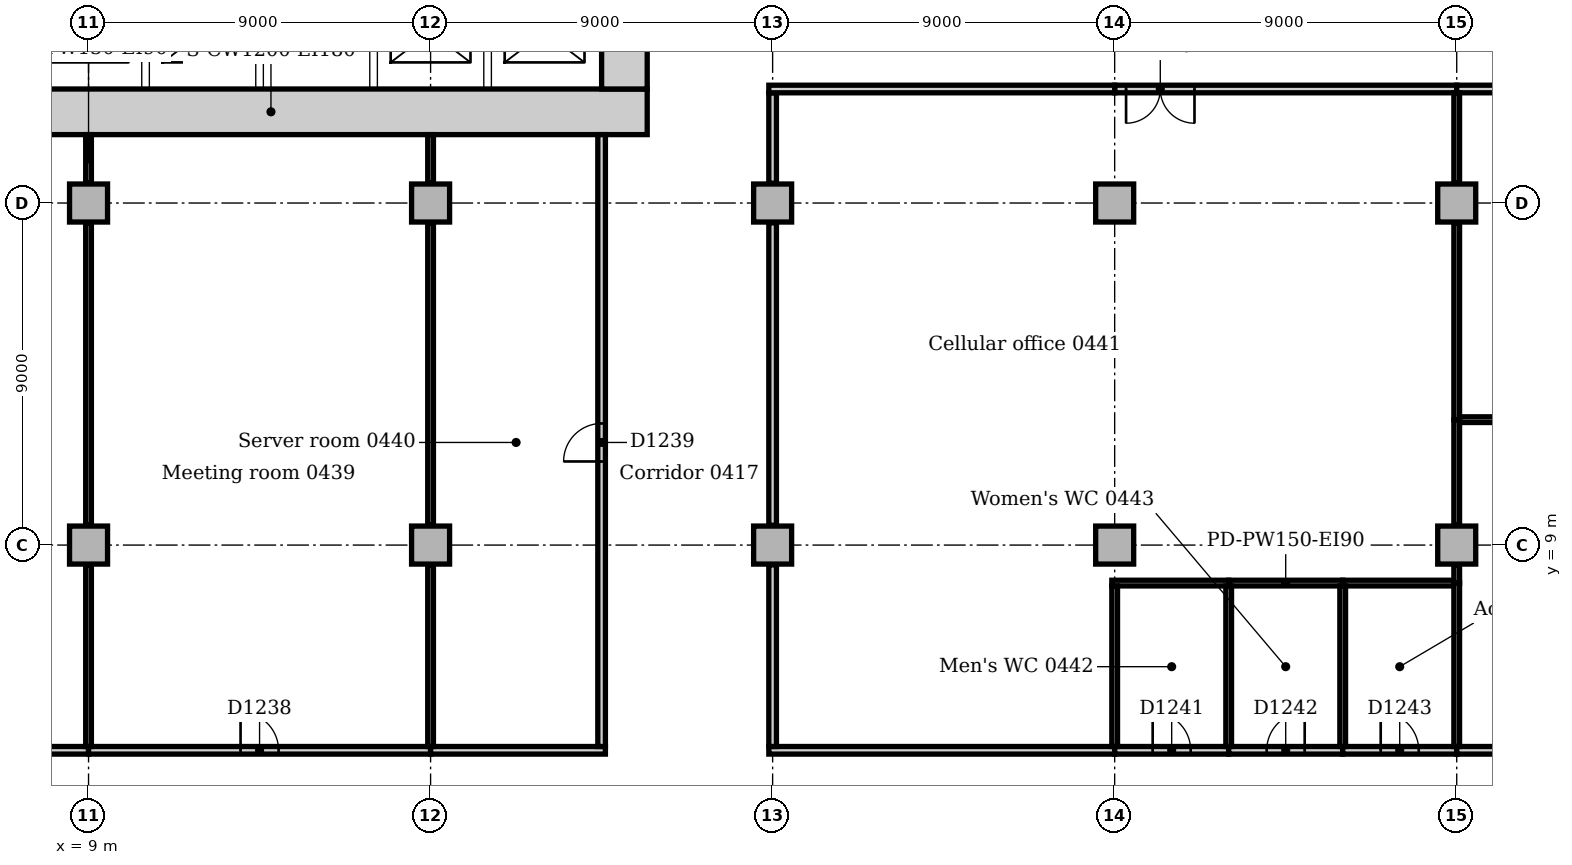
"""IFC4 building model, lengths in metres.
Left out: names, types, materials, properties, quantities, classifications, styles, units other than length and angle.
Written with IfcOpenShell. Run it as: python <this file> out.ifc"""

import sys

from ifc_helpers import new_model, si_unit, direction, frame, frame_2d, origin, origin_2d, place, context, subcontext, project, spatial, rectangle, extrude, element, fill, save


model = new_model("IFC4")
c1 = context("Model", 3, precision=1e-05, world=origin(), true_north=direction((0.0, 1.0)))
c2 = subcontext(c1, "Body", "Model", "MODEL_VIEW")
j1 = project(units=[si_unit("LENGTHUNIT", "METRE"), si_unit("PLANEANGLEUNIT", "RADIAN")], contexts=[c1])
p1 = place(None, origin())
s1 = spatial("IfcSite", under=j1, at=p1, CompositionType="ELEMENT")
p2 = place(p1, origin())
s2 = spatial("IfcBuilding", under=s1, at=p2, CompositionType="ELEMENT")
p3 = place(p2, frame((0.0, 0.0, 21.0)))
s3 = spatial("IfcBuildingStorey", under=s2, at=p3, CompositionType="ELEMENT", Elevation=21.0)
p4 = place(p3, frame((3.9, 20.4, 0.0), z_axis=(0.0, 0.0, 1.0), x_axis=(1.0, 0.0, 0.0)))
e1 = element("IfcWall", 1, at=p4, inside=s3, PredefinedType="SOLIDWALL", context=c2, shape_type="SweptSolid", body=[
    extrude(rectangle(XDim=19.8, YDim=1.2, at=frame_2d((9.9, 0.0))), origin(), (0.0, 0.0, 1.0), 5.0),
])
p5 = place(p3, frame((23.1, 21.0, 0.0), z_axis=(0.0, 0.0, 1.0), x_axis=(0.0, 1.0, 0.0)))
e2 = element("IfcWall", 2, at=p5, inside=s3, PredefinedType="SOLIDWALL", context=c2, shape_type="SweptSolid", body=[
    extrude(rectangle(XDim=10.5, YDim=1.2, at=frame_2d((5.25, 0.0))), origin(), (0.0, 0.0, 1.0), 5.0),
])
p6 = place(p5, frame((4.35, 0.0, 0.0)))
e3 = element("IfcOpeningElement", 3, at=p6, cuts=e2, PredefinedType="OPENING", context=c2, shape_type="SweptSolid", body=[
    extrude(rectangle(XDim=1.8, YDim=2.1, at=frame_2d((0.9, 1.05))), frame((0.0, 0.61, 0.0), z_axis=(0.0, -1.0, 0.0), x_axis=(1.0, 0.0, 0.0)), (0.0, 0.0, 1.0), 1.22),
])
for number, where, z_axis, x_axis in (
    (4, (9.0, 9.0, 0.0), (0.0, 0.0, 1.0), (1.0, 0.0, 0.0)),
    (5, (9.0, 18.0, 0.0), (0.0, 0.0, 1.0), (1.0, 0.0, 0.0)),
    (6, (18.0, 9.0, 0.0), (0.0, 0.0, 1.0), (1.0, 0.0, 0.0)),
    (7, (18.0, 18.0, 0.0), (0.0, 0.0, 1.0), (1.0, 0.0, 0.0)),
    (8, (27.0, 9.0, 0.0), (0.0, 0.0, 1.0), (1.0, 0.0, 0.0)),
    (9, (27.0, 18.0, 0.0), (0.0, 0.0, 1.0), (1.0, 0.0, 0.0)),
    (10, (36.0, 9.0, 0.0), (0.0, 0.0, 1.0), (1.0, 0.0, 0.0)),
    (11, (36.0, 18.0, 0.0), (0.0, 0.0, 1.0), (1.0, 0.0, 0.0)),
    (12, (45.0, 9.0, 0.0), (0.0, 0.0, 1.0), (1.0, 0.0, 0.0)),
    (13, (45.0, 18.0, 0.0), (0.0, 0.0, 1.0), (1.0, 0.0, 0.0)),
):
    element("IfcColumn", number, at=place(p3, frame(where, z_axis=z_axis, x_axis=x_axis)), inside=s3, PredefinedType="COLUMN", context=c2, shape_type="SweptSolid", body=[
        extrude(rectangle(XDim=1.0, YDim=1.0, at=origin_2d()), origin(), (0.0, 0.0, 1.0), 4.85),
    ])
p7 = place(p3, frame((2.073, 3.6, 0.0), z_axis=(0.0, 0.0, 1.0), x_axis=(1.0, 0.0, 0.0)))
e14 = element("IfcWall", 14, at=p7, inside=s3, PredefinedType="PARTITIONING", context=c2, shape_type="SweptSolid", body=[
    extrude(rectangle(XDim=6.927, YDim=0.2, at=frame_2d((3.463, 0.0))), origin(), (0.0, 0.0, 1.0), 4.85),
])
p8 = place(p3, frame((9.0, 3.6, 0.0), z_axis=(0.0, 0.0, 1.0), x_axis=(1.0, 0.0, 0.0)))
e15 = element("IfcWall", 15, at=p8, inside=s3, PredefinedType="PARTITIONING", context=c2, shape_type="SweptSolid", body=[
    extrude(rectangle(XDim=9.0, YDim=0.2, at=frame_2d((4.5, 0.0))), origin(), (0.0, 0.0, 1.0), 4.85),
])
p9 = place(p8, frame((4.0, 0.0, 0.0)))
e16 = element("IfcOpeningElement", 16, at=p9, cuts=e15, PredefinedType="OPENING", context=c2, shape_type="SweptSolid", body=[
    extrude(rectangle(XDim=1.0, YDim=2.1, at=frame_2d((0.5, 1.05))), frame((0.0, 0.11, 0.0), z_axis=(0.0, -1.0, 0.0), x_axis=(1.0, 0.0, 0.0)), (0.0, 0.0, 1.0), 0.22),
])
p10 = place(p3, frame((18.0, 3.6, 0.0), z_axis=(0.0, 0.0, 1.0), x_axis=(1.0, 0.0, 0.0)))
e17 = element("IfcWall", 17, at=p10, inside=s3, PredefinedType="PARTITIONING", context=c2, shape_type="SweptSolid", body=[
    extrude(rectangle(XDim=4.6, YDim=0.2, at=frame_2d((2.3, 0.0))), origin(), (0.0, 0.0, 1.0), 4.85),
])
p11 = place(p3, frame((26.9, 3.6, 0.0), z_axis=(0.0, 0.0, 1.0), x_axis=(1.0, 0.0, 0.0)))
e18 = element("IfcWall", 18, at=p11, inside=s3, PredefinedType="PARTITIONING", context=c2, shape_type="SweptSolid", body=[
    extrude(rectangle(XDim=9.1, YDim=0.2, at=frame_2d((4.55, 0.0))), origin(), (0.0, 0.0, 1.0), 4.85),
])
p12 = place(p3, frame((36.0, 3.6, 0.0), z_axis=(0.0, 0.0, 1.0), x_axis=(1.0, 0.0, 0.0)))
e19 = element("IfcWall", 19, at=p12, inside=s3, PredefinedType="PARTITIONING", context=c2, shape_type="SweptSolid", body=[
    extrude(rectangle(XDim=3.0, YDim=0.2, at=frame_2d((1.5, 0.0))), origin(), (0.0, 0.0, 1.0), 4.85),
])
p13 = place(p12, frame((1.0, 0.0, 0.0)))
e20 = element("IfcOpeningElement", 20, at=p13, cuts=e19, PredefinedType="OPENING", context=c2, shape_type="SweptSolid", body=[
    extrude(rectangle(XDim=1.0, YDim=2.1, at=frame_2d((0.5, 1.05))), frame((0.0, 0.11, 0.0), z_axis=(0.0, -1.0, 0.0), x_axis=(1.0, 0.0, 0.0)), (0.0, 0.0, 1.0), 0.22),
])
p14 = place(p3, frame((39.0, 3.6, 0.0), z_axis=(0.0, 0.0, 1.0), x_axis=(1.0, 0.0, 0.0)))
e21 = element("IfcWall", 21, at=p14, inside=s3, PredefinedType="PARTITIONING", context=c2, shape_type="SweptSolid", body=[
    extrude(rectangle(XDim=3.0, YDim=0.2, at=frame_2d((1.5, 0.0))), origin(), (0.0, 0.0, 1.0), 4.85),
])
p15 = place(p14, frame((1.0, 0.0, 0.0)))
e22 = element("IfcOpeningElement", 22, at=p15, cuts=e21, PredefinedType="OPENING", context=c2, shape_type="SweptSolid", body=[
    extrude(rectangle(XDim=1.0, YDim=2.1, at=frame_2d((0.5, 1.05))), frame((0.0, 0.11, 0.0), z_axis=(0.0, -1.0, 0.0), x_axis=(1.0, 0.0, 0.0)), (0.0, 0.0, 1.0), 0.22),
])
p16 = place(p3, frame((42.0, 3.6, 0.0), z_axis=(0.0, 0.0, 1.0), x_axis=(1.0, 0.0, 0.0)))
e23 = element("IfcWall", 23, at=p16, inside=s3, PredefinedType="PARTITIONING", context=c2, shape_type="SweptSolid", body=[
    extrude(rectangle(XDim=3.0, YDim=0.2, at=frame_2d((1.5, 0.0))), origin(), (0.0, 0.0, 1.0), 4.85),
])
p17 = place(p16, frame((1.0, 0.0, 0.0)))
e24 = element("IfcOpeningElement", 24, at=p17, cuts=e23, PredefinedType="OPENING", context=c2, shape_type="SweptSolid", body=[
    extrude(rectangle(XDim=1.0, YDim=2.1, at=frame_2d((0.5, 1.05))), frame((0.0, 0.11, 0.0), z_axis=(0.0, -1.0, 0.0), x_axis=(1.0, 0.0, 0.0)), (0.0, 0.0, 1.0), 0.22),
])
p18 = place(p3, frame((45.0, 3.6, 0.0), z_axis=(0.0, 0.0, 1.0), x_axis=(1.0, 0.0, 0.0)))
e25 = element("IfcWall", 25, at=p18, inside=s3, PredefinedType="PARTITIONING", context=c2, shape_type="SweptSolid", body=[
    extrude(rectangle(XDim=10.5, YDim=0.2, at=frame_2d((5.25, 0.0))), origin(), (0.0, 0.0, 1.0), 4.7),
])
p19 = place(p18, frame((4.75, 0.0, 0.0)))
e26 = element("IfcOpeningElement", 26, at=p19, cuts=e25, PredefinedType="OPENING", context=c2, shape_type="SweptSolid", body=[
    extrude(rectangle(XDim=1.0, YDim=2.1, at=frame_2d((0.5, 1.05))), frame((0.0, 0.11, 0.0), z_axis=(0.0, -1.0, 0.0), x_axis=(1.0, 0.0, 0.0)), (0.0, 0.0, 1.0), 0.22),
])
p20 = place(p3, frame((22.5, 3.7, 0.0), z_axis=(0.0, 0.0, 1.0), x_axis=(0.0, 1.0, 0.0)))
e27 = element("IfcWall", 27, at=p20, inside=s3, PredefinedType="PARTITIONING", context=c2, shape_type="SweptSolid", body=[
    extrude(rectangle(XDim=16.1, YDim=0.2, at=frame_2d((8.05, 0.0))), origin(), (0.0, 0.0, 1.0), 4.85),
])
p21 = place(p20, frame((7.5, 0.0, 0.0)))
e28 = element("IfcOpeningElement", 28, at=p21, cuts=e27, PredefinedType="OPENING", context=c2, shape_type="SweptSolid", body=[
    extrude(rectangle(XDim=1.0, YDim=2.1, at=frame_2d((0.5, 1.05))), frame((0.0, 0.11, 0.0), z_axis=(0.0, -1.0, 0.0), x_axis=(1.0, 0.0, 0.0)), (0.0, 0.0, 1.0), 0.22),
])
p22 = place(p3, frame((27.0, 3.7, 0.0), z_axis=(0.0, 0.0, 1.0), x_axis=(0.0, 1.0, 0.0)))
e29 = element("IfcWall", 29, at=p22, inside=s3, PredefinedType="PARTITIONING", context=c2, shape_type="SweptSolid", body=[
    extrude(rectangle(XDim=4.78, YDim=0.2, at=frame_2d((2.39, 0.0))), origin(), (0.0, 0.0, 1.0), 4.158),
])
p23 = place(p3, frame((27.0, 9.52, 0.0), z_axis=(0.0, 0.0, 1.0), x_axis=(0.0, 1.0, 0.0)))
e30 = element("IfcWall", 30, at=p23, inside=s3, PredefinedType="PARTITIONING", context=c2, shape_type="SweptSolid", body=[
    extrude(rectangle(XDim=7.96, YDim=0.2, at=frame_2d((3.98, 0.0))), origin(), (0.0, 0.0, 1.0), 4.158),
])
p24 = place(p3, frame((27.0, 18.52, 0.0), z_axis=(0.0, 0.0, 1.0), x_axis=(0.0, 1.0, 0.0)))
e31 = element("IfcWall", 31, at=p24, inside=s3, PredefinedType="PARTITIONING", context=c2, shape_type="SweptSolid", body=[
    extrude(rectangle(XDim=2.38, YDim=0.2, at=frame_2d((1.19, 0.0))), origin(), (0.0, 0.0, 1.0), 4.158),
])
p25 = place(p3, frame((36.0, 21.0, 0.0), z_axis=(0.0, 0.0, 1.0), x_axis=(1.0, 0.0, 0.0)))
e32 = element("IfcWall", 32, at=p25, inside=s3, PredefinedType="PARTITIONING", context=c2, shape_type="SweptSolid", body=[
    extrude(rectangle(XDim=9.0, YDim=0.2, at=frame_2d((4.5, 0.0))), origin(), (0.0, 0.0, 1.0), 4.85),
])
p26 = place(p25, frame((0.3, 0.0, 0.0)))
e33 = element("IfcOpeningElement", 33, at=p26, cuts=e32, PredefinedType="OPENING", context=c2, shape_type="SweptSolid", body=[
    extrude(rectangle(XDim=1.8, YDim=2.1, at=frame_2d((0.9, 1.05))), frame((0.0, 0.11, 0.0), z_axis=(0.0, -1.0, 0.0), x_axis=(1.0, 0.0, 0.0)), (0.0, 0.0, 1.0), 0.22),
])
p27 = place(p3, frame((26.9, 21.0, 0.0), z_axis=(0.0, 0.0, 1.0), x_axis=(1.0, 0.0, 0.0)))
e34 = element("IfcWall", 34, at=p27, inside=s3, PredefinedType="PARTITIONING", context=c2, shape_type="SweptSolid", body=[
    extrude(rectangle(XDim=9.1, YDim=0.2, at=frame_2d((4.55, 0.0))), origin(), (0.0, 0.0, 1.0), 4.85),
])
p28 = place(p3, frame((45.0, 21.0, 0.0), z_axis=(0.0, 0.0, 1.0), x_axis=(1.0, 0.0, 0.0)))
e35 = element("IfcWall", 35, at=p28, inside=s3, PredefinedType="PARTITIONING", context=c2, shape_type="SweptSolid", body=[
    extrude(rectangle(XDim=10.5, YDim=0.2, at=frame_2d((5.25, 0.0))), origin(), (0.0, 0.0, 1.0), 4.85),
])
p29 = place(p28, frame((4.75, 0.0, 0.0)))
e36 = element("IfcOpeningElement", 36, at=p29, cuts=e35, PredefinedType="OPENING", context=c2, shape_type="SweptSolid", body=[
    extrude(rectangle(XDim=1.0, YDim=2.1, at=frame_2d((0.5, 1.05))), frame((0.0, 0.11, 0.0), z_axis=(0.0, -1.0, 0.0), x_axis=(1.0, 0.0, 0.0)), (0.0, 0.0, 1.0), 0.22),
])
p30 = place(p3, frame((9.0, 3.7, 0.0), z_axis=(0.0, 0.0, 1.0), x_axis=(0.0, 1.0, 0.0)))
e37 = element("IfcWall", 37, at=p30, inside=s3, PredefinedType="PARTITIONING", context=c2, shape_type="SweptSolid", body=[
    extrude(rectangle(XDim=4.78, YDim=0.15, at=frame_2d((2.39, 0.0))), origin(), (0.0, 0.0, 1.0), 4.158),
])
p31 = place(p3, frame((9.0, 9.52, 0.0), z_axis=(0.0, 0.0, 1.0), x_axis=(0.0, 1.0, 0.0)))
e38 = element("IfcWall", 38, at=p31, inside=s3, PredefinedType="PARTITIONING", context=c2, shape_type="SweptSolid", body=[
    extrude(rectangle(XDim=7.96, YDim=0.15, at=frame_2d((3.98, 0.0))), origin(), (0.0, 0.0, 1.0), 4.158),
])
p32 = place(p3, frame((9.0, 18.52, 0.0), z_axis=(0.0, 0.0, 1.0), x_axis=(0.0, 1.0, 0.0)))
e39 = element("IfcWall", 39, at=p32, inside=s3, PredefinedType="PARTITIONING", context=c2, shape_type="SweptSolid", body=[
    extrude(rectangle(XDim=1.28, YDim=0.15, at=frame_2d((0.64, 0.0))), origin(), (0.0, 0.0, 1.0), 4.652),
])
p33 = place(p3, frame((18.0, 3.7, 0.0), z_axis=(0.0, 0.0, 1.0), x_axis=(0.0, 1.0, 0.0)))
e40 = element("IfcWall", 40, at=p33, inside=s3, PredefinedType="PARTITIONING", context=c2, shape_type="SweptSolid", body=[
    extrude(rectangle(XDim=4.78, YDim=0.15, at=frame_2d((2.39, 0.0))), origin(), (0.0, 0.0, 1.0), 4.158),
])
p34 = place(p3, frame((18.0, 9.52, 0.0), z_axis=(0.0, 0.0, 1.0), x_axis=(0.0, 1.0, 0.0)))
e41 = element("IfcWall", 41, at=p34, inside=s3, PredefinedType="PARTITIONING", context=c2, shape_type="SweptSolid", body=[
    extrude(rectangle(XDim=7.96, YDim=0.15, at=frame_2d((3.98, 0.0))), origin(), (0.0, 0.0, 1.0), 4.158),
])
p35 = place(p3, frame((18.0, 18.52, 0.0), z_axis=(0.0, 0.0, 1.0), x_axis=(0.0, 1.0, 0.0)))
e42 = element("IfcWall", 42, at=p35, inside=s3, PredefinedType="PARTITIONING", context=c2, shape_type="SweptSolid", body=[
    extrude(rectangle(XDim=1.28, YDim=0.15, at=frame_2d((0.64, 0.0))), origin(), (0.0, 0.0, 1.0), 4.652),
])
p36 = place(p3, frame((35.925, 8.0, 0.0), z_axis=(0.0, 0.0, 1.0), x_axis=(1.0, 0.0, 0.0)))
e43 = element("IfcWall", 43, at=p36, inside=s3, PredefinedType="PARTITIONING", context=c2, shape_type="SweptSolid", body=[
    extrude(rectangle(XDim=3.075, YDim=0.15, at=frame_2d((1.538, 0.0))), origin(), (0.0, 0.0, 1.0), 4.85),
])
p37 = place(p3, frame((36.0, 3.7, 0.0), z_axis=(0.0, 0.0, 1.0), x_axis=(0.0, 1.0, 0.0)))
e44 = element("IfcWall", 44, at=p37, inside=s3, PredefinedType="PARTITIONING", context=c2, shape_type="SweptSolid", body=[
    extrude(rectangle(XDim=4.225, YDim=0.15, at=frame_2d((2.112, 0.0))), origin(), (0.0, 0.0, 1.0), 4.158),
])
p38 = place(p3, frame((39.0, 8.0, 0.0), z_axis=(0.0, 0.0, 1.0), x_axis=(1.0, 0.0, 0.0)))
e45 = element("IfcWall", 45, at=p38, inside=s3, PredefinedType="PARTITIONING", context=c2, shape_type="SweptSolid", body=[
    extrude(rectangle(XDim=3.0, YDim=0.15, at=frame_2d((1.5, 0.0))), origin(), (0.0, 0.0, 1.0), 4.85),
])
p39 = place(p3, frame((42.0, 8.0, 0.0), z_axis=(0.0, 0.0, 1.0), x_axis=(1.0, 0.0, 0.0)))
e46 = element("IfcWall", 46, at=p39, inside=s3, PredefinedType="PARTITIONING", context=c2, shape_type="SweptSolid", body=[
    extrude(rectangle(XDim=2.925, YDim=0.15, at=frame_2d((1.462, 0.0))), origin(), (0.0, 0.0, 1.0), 4.85),
])
p40 = place(p3, frame((45.0, 8.0, 0.0), z_axis=(0.0, 0.0, 1.0), x_axis=(0.0, 1.0, 0.0)))
e47 = element("IfcWall", 47, at=p40, inside=s3, PredefinedType="PARTITIONING", context=c2, shape_type="SweptSolid", body=[
    extrude(rectangle(XDim=0.48, YDim=0.15, at=frame_2d((0.24, 0.0))), origin(), (0.0, 0.0, 1.0), 4.85),
])
p41 = place(p3, frame((45.0, 9.52, 0.0), z_axis=(0.0, 0.0, 1.0), x_axis=(0.0, 1.0, 0.0)))
e48 = element("IfcWall", 48, at=p41, inside=s3, PredefinedType="PARTITIONING", context=c2, shape_type="SweptSolid", body=[
    extrude(rectangle(XDim=2.78, YDim=0.15, at=frame_2d((1.39, 0.0))), origin(), (0.0, 0.0, 1.0), 4.158),
])
p42 = place(p3, frame((45.0, 12.3, 0.0), z_axis=(0.0, 0.0, 1.0), x_axis=(0.0, 1.0, 0.0)))
e49 = element("IfcWall", 49, at=p42, inside=s3, PredefinedType="PARTITIONING", context=c2, shape_type="SweptSolid", body=[
    extrude(rectangle(XDim=5.18, YDim=0.15, at=frame_2d((2.59, 0.0))), origin(), (0.0, 0.0, 1.0), 4.158),
])
p43 = place(p3, frame((45.0, 18.52, 0.0), z_axis=(0.0, 0.0, 1.0), x_axis=(0.0, 1.0, 0.0)))
e50 = element("IfcWall", 50, at=p43, inside=s3, PredefinedType="PARTITIONING", context=c2, shape_type="SweptSolid", body=[
    extrude(rectangle(XDim=2.38, YDim=0.15, at=frame_2d((1.19, 0.0))), origin(), (0.0, 0.0, 1.0), 4.158),
])
for number, where, z_axis, x_axis in (
    (51, (39.0, 3.7, 0.0), (0.0, 0.0, 1.0), (0.0, 1.0, 0.0)),
    (52, (42.0, 3.7, 0.0), (0.0, 0.0, 1.0), (0.0, 1.0, 0.0)),
):
    element("IfcWall", number, at=place(p3, frame(where, z_axis=z_axis, x_axis=x_axis)), inside=s3, PredefinedType="PARTITIONING", context=c2, shape_type="SweptSolid", body=[
        extrude(rectangle(XDim=4.225, YDim=0.15, at=frame_2d((2.112, 0.0))), origin(), (0.0, 0.0, 1.0), 4.85),
    ])
p44 = place(p3, frame((45.0, 3.7, 0.0), z_axis=(0.0, 0.0, 1.0), x_axis=(0.0, 1.0, 0.0)))
e53 = element("IfcWall", 53, at=p44, inside=s3, PredefinedType="PARTITIONING", context=c2, shape_type="SweptSolid", body=[
    extrude(rectangle(XDim=4.3, YDim=0.15, at=frame_2d((2.15, 0.0))), origin(), (0.0, 0.0, 1.0), 4.158),
])
p45 = place(p3, frame((45.075, 12.3, 0.0), z_axis=(0.0, 0.0, 1.0), x_axis=(1.0, 0.0, 0.0)))
e54 = element("IfcWall", 54, at=p45, inside=s3, PredefinedType="PARTITIONING", context=c2, shape_type="SweptSolid", body=[
    extrude(rectangle(XDim=10.425, YDim=0.15, at=frame_2d((5.213, 0.0))), origin(), (0.0, 0.0, 1.0), 4.85),
])
for number, where, z_axis, x_axis in (
    (55, (10.5, 21.0, 0.0), (0.0, 0.0, 1.0), (0.0, 1.0, 0.0)),
    (56, (13.5, 21.0, 0.0), (0.0, 0.0, 1.0), (0.0, 1.0, 0.0)),
    (57, (16.5, 21.0, 0.0), (0.0, 0.0, 1.0), (0.0, 1.0, 0.0)),
    (58, (19.5, 21.0, 0.0), (0.0, 0.0, 1.0), (0.0, 1.0, 0.0)),
):
    element("IfcWall", number, at=place(p3, frame(where, z_axis=z_axis, x_axis=x_axis)), inside=s3, PredefinedType="PARTITIONING", context=c2, shape_type="SweptSolid", body=[
        extrude(rectangle(XDim=2.9, YDim=0.2, at=frame_2d((1.45, 0.0))), origin(), (0.0, 0.0, 1.0), 4.85),
    ])
p46 = place(p9, origin())
e59 = element("IfcDoor", 59, at=p46, inside=s3, OperationType="SINGLE_SWING_LEFT", PredefinedType="DOOR", context=c2, shape_type="SweptSolid", body=[
    extrude(rectangle(XDim=1.0, YDim=2.1, at=frame_2d((0.5, 1.05))), frame((0.0, 0.025, 0.0), z_axis=(0.0, -1.0, 0.0), x_axis=(1.0, 0.0, 0.0)), (0.0, 0.0, 1.0), 0.05),
])
fill(e16, e59)
p47 = place(p21, origin())
e60 = element("IfcDoor", 60, at=p47, inside=s3, OperationType="SINGLE_SWING_LEFT", PredefinedType="DOOR", context=c2, shape_type="SweptSolid", body=[
    extrude(rectangle(XDim=1.0, YDim=2.1, at=frame_2d((0.5, 1.05))), frame((0.0, 0.025, 0.0), z_axis=(0.0, -1.0, 0.0), x_axis=(1.0, 0.0, 0.0)), (0.0, 0.0, 1.0), 0.05),
])
fill(e28, e60)
p48 = place(p26, frame((1.8, 0.0, 0.0), z_axis=(0.0, 0.0, 1.0), x_axis=(-1.0, 0.0, 0.0)))
e61 = element("IfcDoor", 61, at=p48, inside=s3, OperationType="DOUBLE_DOOR_SINGLE_SWING", PredefinedType="DOOR", context=c2, shape_type="SweptSolid", body=[
    extrude(rectangle(XDim=1.8, YDim=2.1, at=frame_2d((0.9, 1.05))), frame((0.0, 0.025, 0.0), z_axis=(0.0, -1.0, 0.0), x_axis=(1.0, 0.0, 0.0)), (0.0, 0.0, 1.0), 0.05),
])
fill(e33, e61)
p49 = place(p13, origin())
e62 = element("IfcDoor", 62, at=p49, inside=s3, OperationType="SINGLE_SWING_LEFT", PredefinedType="DOOR", context=c2, shape_type="SweptSolid", body=[
    extrude(rectangle(XDim=1.0, YDim=2.1, at=frame_2d((0.5, 1.05))), frame((0.0, 0.025, 0.0), z_axis=(0.0, -1.0, 0.0), x_axis=(1.0, 0.0, 0.0)), (0.0, 0.0, 1.0), 0.05),
])
fill(e20, e62)
p50 = place(p15, origin())
e63 = element("IfcDoor", 63, at=p50, inside=s3, OperationType="SINGLE_SWING_RIGHT", PredefinedType="DOOR", context=c2, shape_type="SweptSolid", body=[
    extrude(rectangle(XDim=1.0, YDim=2.1, at=frame_2d((0.5, 1.05))), frame((0.0, 0.025, 0.0), z_axis=(0.0, -1.0, 0.0), x_axis=(1.0, 0.0, 0.0)), (0.0, 0.0, 1.0), 0.05),
])
fill(e22, e63)
p51 = place(p17, origin())
e64 = element("IfcDoor", 64, at=p51, inside=s3, OperationType="SINGLE_SWING_LEFT", PredefinedType="DOOR", context=c2, shape_type="SweptSolid", body=[
    extrude(rectangle(XDim=1.0, YDim=2.1, at=frame_2d((0.5, 1.05))), frame((0.0, 0.025, 0.0), z_axis=(0.0, -1.0, 0.0), x_axis=(1.0, 0.0, 0.0)), (0.0, 0.0, 1.0), 0.05),
])
fill(e24, e64)
save(model, sys.argv[1])
